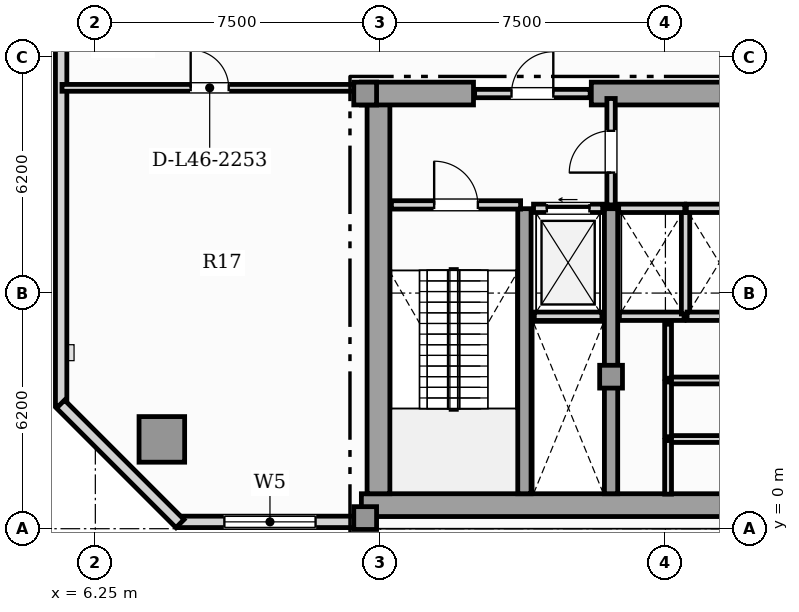
"""IFC4 building model, lengths in metres.
Left out: names, types, materials, properties, quantities, classifications, styles, units other than length and angle.
Written with IfcOpenShell. Run it as: python <this file> out.ifc"""

import sys

from ifc_helpers import new_model, si_unit, direction, frame, frame_2d, origin, origin_2d, place, context, subcontext, project, spatial, rectangle, hollow_rectangle, extrude, element, fill, save


model = new_model("IFC4")
c1 = context("Model", 3, precision=1e-05, world=origin(), true_north=direction((0.0, 1.0)))
c2 = subcontext(c1, "Body", "Model", "MODEL_VIEW")
j1 = project(units=[si_unit("LENGTHUNIT", "METRE"), si_unit("PLANEANGLEUNIT", "RADIAN")], contexts=[c1])
p1 = place(None, origin())
s1 = spatial("IfcSite", under=j1, at=p1, CompositionType="ELEMENT")
p2 = place(p1, origin())
s2 = spatial("IfcBuilding", under=s1, at=p2, CompositionType="ELEMENT")
p3 = place(p2, frame((0.0, 0.0, 187.55)))
s3 = spatial("IfcBuildingStorey", under=s2, at=p3, CompositionType="ELEMENT", Elevation=187.55)
p4 = place(p3, frame((13.25, 0.62, 0.0), z_axis=(0.0, 0.0, 1.0), x_axis=(1.0, 0.0, 0.0)))
e1 = element("IfcWall", 1, at=p4, inside=s3, PredefinedType="SHEAR", context=c2, shape_type="SweptSolid", body=[
    extrude(rectangle(XDim=31.0, YDim=0.6, at=frame_2d((15.5, 0.0))), origin(), (0.0, 0.0, 1.0), 4.83),
])
p5 = place(p3, frame((13.7, 0.92, 0.0), z_axis=(0.0, 0.0, 1.0), x_axis=(0.0, 1.0, 0.0)))
e2 = element("IfcWall", 2, at=p5, inside=s3, PredefinedType="SHEAR", context=c2, shape_type="SweptSolid", body=[
    extrude(rectangle(XDim=10.53, YDim=0.6, at=frame_2d((5.265, 0.0))), origin(), (0.0, 0.0, 1.0), 4.83),
])
p6 = place(p3, frame((13.25, 11.45, 0.0), z_axis=(0.0, 0.0, 1.0), x_axis=(1.0, 0.0, 0.0)))
e3 = element("IfcWall", 3, at=p6, inside=s3, PredefinedType="SHEAR", context=c2, shape_type="SweptSolid", body=[
    extrude(rectangle(XDim=2.95, YDim=0.6, at=frame_2d((1.475, 0.0))), origin(), (0.0, 0.0, 1.0), 4.83),
])
p7 = place(p3, frame((19.3, 11.45, 0.0), z_axis=(0.0, 0.0, 1.0), x_axis=(1.0, 0.0, 0.0)))
e4 = element("IfcWall", 4, at=p7, inside=s3, PredefinedType="SHEAR", context=c2, shape_type="SweptSolid", body=[
    extrude(rectangle(XDim=7.3, YDim=0.6, at=frame_2d((3.65, 0.0))), origin(), (0.0, 0.0, 1.0), 4.83),
])
for number, where, z_axis, x_axis in (
    (5, (17.54, 0.92, 0.0), (0.0, 0.0, 1.0), (0.0, 1.0, 0.0)),
    (6, (19.82, 0.92, 0.0), (0.0, 0.0, 1.0), (0.0, 1.0, 0.0)),
):
    element("IfcWall", number, at=place(p3, frame(where, z_axis=z_axis, x_axis=x_axis)), inside=s3, PredefinedType="SHEAR", context=c2, shape_type="SweptSolid", body=[
        extrude(rectangle(XDim=7.5, YDim=0.35, at=frame_2d((3.75, 0.0))), origin(), (0.0, 0.0, 1.0), 4.83),
    ])
for number, where, z_axis, x_axis in (
    (7, (13.35, 0.28, 0.0), (0.0, 0.0, 1.0), (1.0, 0.0, 0.0)),
    (8, (13.35, 11.45, 0.0), (0.0, 0.0, 1.0), (1.0, 0.0, 0.0)),
    (9, (19.82, 4.0, 0.0), (0.0, 0.0, 1.0), (1.0, 0.0, 0.0)),
):
    element("IfcColumn", number, at=place(p3, frame(where, z_axis=z_axis, x_axis=x_axis)), inside=s3, PredefinedType="COLUMN", context=c2, shape_type="SweptSolid", body=[
        extrude(rectangle(XDim=0.6, YDim=0.6, at=origin_2d()), origin(), (0.0, 0.0, 1.0), 5.05),
    ])
p8 = place(p3, frame((8.0, 2.35, 0.0), z_axis=(0.0, 0.0, 1.0), x_axis=(1.0, 0.0, 0.0)))
e10 = element("IfcColumn", 10, at=p8, inside=s3, PredefinedType="USERDEFINED", context=c2, shape_type="SweptSolid", body=[
    extrude(hollow_rectangle(XDim=1.2, YDim=1.2, WallThickness=0.07, at=origin_2d()), origin(), (0.0, 0.0, 1.0), 5.05),
])
p9 = place(p3, frame((8.44, 0.18, 0.0), z_axis=(0.0, 0.0, 1.0), x_axis=(1.0, 0.0, 0.0)))
e11 = element("IfcWall", 11, at=p9, inside=s3, PredefinedType="SOLIDWALL", context=c2, shape_type="SweptSolid", body=[
    extrude(rectangle(XDim=4.81, YDim=0.3, at=frame_2d((2.405, 0.0))), origin(), (0.0, 0.0, 1.0), 4.83),
])
p10 = place(p9, frame((1.205, 0.0, 0.85)))
e12 = element("IfcOpeningElement", 12, at=p10, cuts=e11, PredefinedType="OPENING", context=c2, shape_type="SweptSolid", body=[
    extrude(rectangle(XDim=2.4, YDim=2.0, at=frame_2d((1.2, 1.0))), frame((0.0, 0.16, 0.0), z_axis=(0.0, -1.0, 0.0), x_axis=(1.0, 0.0, 0.0)), (0.0, 0.0, 1.0), 0.32),
])
p11 = place(p3, frame((5.35, 37.16, 0.0), z_axis=(0.0, 0.0, 1.0), x_axis=(0.0, -1.0, 0.0)))
e13 = element("IfcWall", 13, at=p11, inside=s3, PredefinedType="SOLIDWALL", context=c2, shape_type="SweptSolid", body=[
    extrude(rectangle(XDim=33.92, YDim=0.3, at=frame_2d((16.96, 0.0))), origin(), (0.0, 0.0, 1.0), 4.83),
])
p12 = place(p11, frame((2.46, 0.0, 0.95)))
e14 = element("IfcOpeningElement", 14, at=p12, cuts=e13, PredefinedType="OPENING", context=c2, shape_type="SweptSolid", body=[
    extrude(rectangle(XDim=0.9, YDim=1.5, at=frame_2d((0.45, 0.75))), frame((0.0, 0.16, 0.0), z_axis=(0.0, -1.0, 0.0), x_axis=(1.0, 0.0, 0.0)), (0.0, 0.0, 1.0), 0.32),
])
p13 = place(p11, frame((11.327, 0.0, 0.9)))
e15 = element("IfcOpeningElement", 15, at=p13, cuts=e13, PredefinedType="OPENING", context=c2, shape_type="SweptSolid", body=[
    extrude(rectangle(XDim=1.5, YDim=1.95, at=frame_2d((0.75, 0.975))), frame((0.0, 0.16, 0.0), z_axis=(0.0, -1.0, 0.0), x_axis=(1.0, 0.0, 0.0)), (0.0, 0.0, 1.0), 0.32),
])
p14 = place(p3, frame((5.334, 3.278, 0.0), z_axis=(0.0, 0.0, 1.0), x_axis=(0.707106781187, -0.707106781187, 0.0)))
e16 = element("IfcWall", 16, at=p14, inside=s3, PredefinedType="SOLIDWALL", context=c2, shape_type="SweptSolid", body=[
    extrude(rectangle(XDim=4.445, YDim=0.3, at=frame_2d((2.223, 0.0))), origin(), (0.0, 0.0, 1.0), 4.83),
])
p15 = place(p3, frame((17.8, 5.59, 0.0), z_axis=(0.0, 0.0, 1.0), x_axis=(1.0, 0.0, 0.0)))
e17 = element("IfcWall", 17, at=p15, inside=s3, PredefinedType="SOLIDWALL", context=c2, shape_type="SweptSolid", body=[
    extrude(rectangle(XDim=1.78, YDim=0.22, at=frame_2d((0.89, 0.0))), origin(), (0.0, 0.0, 1.0), 4.83),
])
p16 = place(p3, frame((17.78, 8.43, 0.0), z_axis=(0.0, 0.0, 1.0), x_axis=(1.0, 0.0, 0.0)))
e18 = element("IfcWall", 18, at=p16, inside=s3, PredefinedType="SOLIDWALL", context=c2, shape_type="SweptSolid", body=[
    extrude(rectangle(XDim=1.82, YDim=0.22, at=frame_2d((0.91, 0.0))), origin(), (0.0, 0.0, 1.0), 4.83),
])
p17 = place(p16, frame((0.35, 0.0, 0.0)))
e19 = element("IfcOpeningElement", 19, at=p17, cuts=e18, PredefinedType="OPENING", context=c2, shape_type="SweptSolid", body=[
    extrude(rectangle(XDim=1.12, YDim=2.25, at=frame_2d((0.56, 1.125))), frame((0.0, 0.12, 0.0), z_axis=(0.0, -1.0, 0.0), x_axis=(1.0, 0.0, 0.0)), (0.0, 0.0, 1.0), 0.24),
])
p18 = place(p3, frame((20.04, 5.59, 0.0), z_axis=(0.0, 0.0, 1.0), x_axis=(1.0, 0.0, 0.0)))
e20 = element("IfcWall", 20, at=p18, inside=s3, PredefinedType="SOLIDWALL", context=c2, shape_type="SweptSolid", body=[
    extrude(rectangle(XDim=1.7, YDim=0.22, at=frame_2d((0.85, 0.0))), origin(), (0.0, 0.0, 1.0), 4.83),
])
p19 = place(p3, frame((21.78, 5.65, 0.0), z_axis=(0.0, 0.0, 1.0), x_axis=(0.0, 1.0, 0.0)))
e21 = element("IfcWall", 21, at=p19, inside=s3, PredefinedType="SOLIDWALL", context=c2, shape_type="SweptSolid", body=[
    extrude(rectangle(XDim=2.7, YDim=0.22, at=frame_2d((1.35, 0.0))), origin(), (0.0, 0.0, 1.0), 4.83),
])
p20 = place(p3, frame((20.02, 8.43, 0.0), z_axis=(0.0, 0.0, 1.0), x_axis=(1.0, 0.0, 0.0)))
e22 = element("IfcWall", 22, at=p20, inside=s3, PredefinedType="SOLIDWALL", context=c2, shape_type="SweptSolid", body=[
    extrude(rectangle(XDim=1.74, YDim=0.22, at=frame_2d((0.87, 0.0))), origin(), (0.0, 0.0, 1.0), 4.83),
])
p21 = place(p3, frame((21.82, 5.59, 0.0), z_axis=(0.0, 0.0, 1.0), x_axis=(1.0, 0.0, 0.0)))
e23 = element("IfcWall", 23, at=p21, inside=s3, PredefinedType="SOLIDWALL", context=c2, shape_type="SweptSolid", body=[
    extrude(rectangle(XDim=1.7, YDim=0.22, at=frame_2d((0.85, 0.0))), origin(), (0.0, 0.0, 1.0), 4.83),
])
p22 = place(p3, frame((21.8, 8.43, 0.0), z_axis=(0.0, 0.0, 1.0), x_axis=(1.0, 0.0, 0.0)))
e24 = element("IfcWall", 24, at=p22, inside=s3, PredefinedType="SOLIDWALL", context=c2, shape_type="SweptSolid", body=[
    extrude(rectangle(XDim=1.74, YDim=0.22, at=frame_2d((0.87, 0.0))), origin(), (0.0, 0.0, 1.0), 4.83),
])
p23 = place(p3, frame((14.04, 8.52, 0.0), z_axis=(0.0, 0.0, 1.0), x_axis=(1.0, 0.0, 0.0)))
e25 = element("IfcWall", 25, at=p23, inside=s3, PredefinedType="SOLIDWALL", context=c2, shape_type="SweptSolid", body=[
    extrude(rectangle(XDim=3.4, YDim=0.22, at=frame_2d((1.7, 0.0))), origin(), (0.0, 0.0, 1.0), 4.83),
])
p24 = place(p23, frame((1.125, 0.0, 0.0)))
e26 = element("IfcOpeningElement", 26, at=p24, cuts=e25, PredefinedType="OPENING", context=c2, shape_type="SweptSolid", body=[
    extrude(rectangle(XDim=1.15, YDim=2.2, at=frame_2d((0.575, 1.1))), frame((0.0, 0.12, 0.0), z_axis=(0.0, -1.0, 0.0), x_axis=(1.0, 0.0, 0.0)), (0.0, 0.0, 1.0), 0.24),
])
p25 = place(p3, frame((19.82, 8.52, 0.0), z_axis=(0.0, 0.0, 1.0), x_axis=(0.0, 1.0, 0.0)))
e27 = element("IfcWall", 27, at=p25, inside=s3, PredefinedType="SOLIDWALL", context=c2, shape_type="SweptSolid", body=[
    extrude(rectangle(XDim=2.8, YDim=0.22, at=frame_2d((1.4, 0.0))), origin(), (0.0, 0.0, 1.0), 4.285),
])
p26 = place(p25, frame((0.85, 0.0, 0.0)))
e28 = element("IfcOpeningElement", 28, at=p26, cuts=e27, PredefinedType="OPENING", context=c2, shape_type="SweptSolid", body=[
    extrude(rectangle(XDim=1.1, YDim=2.2, at=frame_2d((0.55, 1.1))), frame((0.0, 0.12, 0.0), z_axis=(0.0, -1.0, 0.0), x_axis=(1.0, 0.0, 0.0)), (0.0, 0.0, 1.0), 0.24),
])
p27 = place(p3, frame((16.23, 11.45, 0.0), z_axis=(0.0, 0.0, 1.0), x_axis=(1.0, 0.0, 0.0)))
e29 = element("IfcWall", 29, at=p27, inside=s3, PredefinedType="SOLIDWALL", context=c2, shape_type="SweptSolid", body=[
    extrude(rectangle(XDim=3.04, YDim=0.22, at=frame_2d((1.52, 0.0))), origin(), (0.0, 0.0, 1.0), 4.83),
])
p28 = place(p27, frame((0.97, 0.0, 0.0)))
e30 = element("IfcOpeningElement", 30, at=p28, cuts=e29, PredefinedType="OPENING", context=c2, shape_type="SweptSolid", body=[
    extrude(rectangle(XDim=1.1, YDim=2.2, at=frame_2d((0.55, 1.1))), frame((0.0, 0.12, 0.0), z_axis=(0.0, -1.0, 0.0), x_axis=(1.0, 0.0, 0.0)), (0.0, 0.0, 1.0), 0.24),
])
p29 = place(p3, frame((21.36, 2.36, 0.0), z_axis=(0.0, 0.0, 1.0), x_axis=(1.0, 0.0, 0.0)))
e31 = element("IfcWall", 31, at=p29, inside=s3, PredefinedType="PARTITIONING", context=c2, shape_type="SweptSolid", body=[
    extrude(rectangle(XDim=3.94, YDim=0.18, at=frame_2d((1.97, 0.0))), origin(), (0.0, 0.0, 1.0), 4.83),
])
p30 = place(p3, frame((21.32, 0.91, 0.0), z_axis=(0.0, 0.0, 1.0), x_axis=(0.0, 1.0, 0.0)))
e32 = element("IfcWall", 32, at=p30, inside=s3, PredefinedType="PARTITIONING", context=c2, shape_type="SweptSolid", body=[
    extrude(rectangle(XDim=1.41, YDim=0.18, at=frame_2d((0.705, 0.0))), origin(), (0.0, 0.0, 1.0), 4.83),
])
p31 = place(p3, frame((21.36, 3.9, 0.0), z_axis=(0.0, 0.0, 1.0), x_axis=(1.0, 0.0, 0.0)))
e33 = element("IfcWall", 33, at=p31, inside=s3, PredefinedType="PARTITIONING", context=c2, shape_type="SweptSolid", body=[
    extrude(rectangle(XDim=3.94, YDim=0.18, at=frame_2d((1.97, 0.0))), origin(), (0.0, 0.0, 1.0), 4.83),
])
p32 = place(p3, frame((21.32, 2.42, 0.0), z_axis=(0.0, 0.0, 1.0), x_axis=(0.0, 1.0, 0.0)))
e34 = element("IfcWall", 34, at=p32, inside=s3, PredefinedType="PARTITIONING", context=c2, shape_type="SweptSolid", body=[
    extrude(rectangle(XDim=1.44, YDim=0.18, at=frame_2d((0.72, 0.0))), origin(), (0.0, 0.0, 1.0), 4.83),
])
p33 = place(p3, frame((21.32, 3.96, 0.0), z_axis=(0.0, 0.0, 1.0), x_axis=(0.0, 1.0, 0.0)))
e35 = element("IfcWall", 35, at=p33, inside=s3, PredefinedType="PARTITIONING", context=c2, shape_type="SweptSolid", body=[
    extrude(rectangle(XDim=1.42, YDim=0.18, at=frame_2d((0.71, 0.0))), origin(), (0.0, 0.0, 1.0), 4.83),
])
p34 = place(p3, frame((5.373, 11.6, 0.0), z_axis=(0.0, 0.0, 1.0), x_axis=(1.0, 0.0, 0.0)))
e36 = element("IfcWall", 36, at=p34, inside=s3, PredefinedType="PARTITIONING", context=c2, shape_type="SweptSolid", body=[
    extrude(rectangle(XDim=7.772, YDim=0.18, at=frame_2d((3.886, 0.0))), origin(), (0.0, 0.0, 1.0), 4.83),
])
p35 = place(p34, frame((3.386, 0.0, 0.0)))
e37 = element("IfcOpeningElement", 37, at=p35, cuts=e36, PredefinedType="OPENING", context=c2, shape_type="SweptSolid", body=[
    extrude(rectangle(XDim=1.0, YDim=2.15, at=frame_2d((0.5, 1.075))), frame((0.0, 0.1, 0.0), z_axis=(0.0, -1.0, 0.0), x_axis=(1.0, 0.0, 0.0)), (0.0, 0.0, 1.0), 0.2),
])
p36 = place(p10, origin())
e38 = element("IfcWindow", 38, at=p36, inside=s3, PartitioningType="SINGLE_PANEL", PredefinedType="WINDOW", context=c2, shape_type="SweptSolid", body=[
    extrude(rectangle(XDim=2.4, YDim=2.0, at=frame_2d((1.2, 1.0))), frame((0.0, 0.03, 0.0), z_axis=(0.0, -1.0, 0.0), x_axis=(1.0, 0.0, 0.0)), (0.0, 0.0, 1.0), 0.06),
])
fill(e12, e38)
p37 = place(p17, origin())
e39 = element("IfcDoor", 39, at=p37, inside=s3, OperationType="SLIDING_TO_LEFT", PredefinedType="DOOR", context=c2, shape_type="SweptSolid", body=[
    extrude(rectangle(XDim=1.12, YDim=2.25, at=frame_2d((0.56, 1.125))), frame((0.0, 0.025, 0.0), z_axis=(0.0, -1.0, 0.0), x_axis=(1.0, 0.0, 0.0)), (0.0, 0.0, 1.0), 0.05),
])
fill(e19, e39)
p38 = place(p24, origin())
e40 = element("IfcDoor", 40, at=p38, inside=s3, OperationType="SINGLE_SWING_LEFT", PredefinedType="DOOR", context=c2, shape_type="SweptSolid", body=[
    extrude(rectangle(XDim=1.15, YDim=2.2, at=frame_2d((0.575, 1.1))), frame((0.0, 0.025, 0.0), z_axis=(0.0, -1.0, 0.0), x_axis=(1.0, 0.0, 0.0)), (0.0, 0.0, 1.0), 0.05),
])
fill(e26, e40)
p39 = place(p26, origin())
e41 = element("IfcDoor", 41, at=p39, inside=s3, OperationType="SINGLE_SWING_LEFT", PredefinedType="DOOR", context=c2, shape_type="SweptSolid", body=[
    extrude(rectangle(XDim=1.1, YDim=2.2, at=frame_2d((0.55, 1.1))), frame((0.0, 0.025, 0.0), z_axis=(0.0, -1.0, 0.0), x_axis=(1.0, 0.0, 0.0)), (0.0, 0.0, 1.0), 0.05),
])
fill(e28, e41)
p40 = place(p28, origin())
e42 = element("IfcDoor", 42, at=p40, inside=s3, OperationType="SINGLE_SWING_RIGHT", PredefinedType="DOOR", context=c2, shape_type="SweptSolid", body=[
    extrude(rectangle(XDim=1.1, YDim=2.2, at=frame_2d((0.55, 1.1))), frame((0.0, 0.025, 0.0), z_axis=(0.0, -1.0, 0.0), x_axis=(1.0, 0.0, 0.0)), (0.0, 0.0, 1.0), 0.05),
])
fill(e30, e42)
p41 = place(p35, origin())
e43 = element("IfcDoor", 43, at=p41, inside=s3, OperationType="SINGLE_SWING_LEFT", PredefinedType="DOOR", context=c2, shape_type="SweptSolid", body=[
    extrude(rectangle(XDim=1.0, YDim=2.15, at=frame_2d((0.5, 1.075))), frame((0.0, 0.025, 0.0), z_axis=(0.0, -1.0, 0.0), x_axis=(1.0, 0.0, 0.0)), (0.0, 0.0, 1.0), 0.05),
])
fill(e37, e43)
save(model, sys.argv[1])
